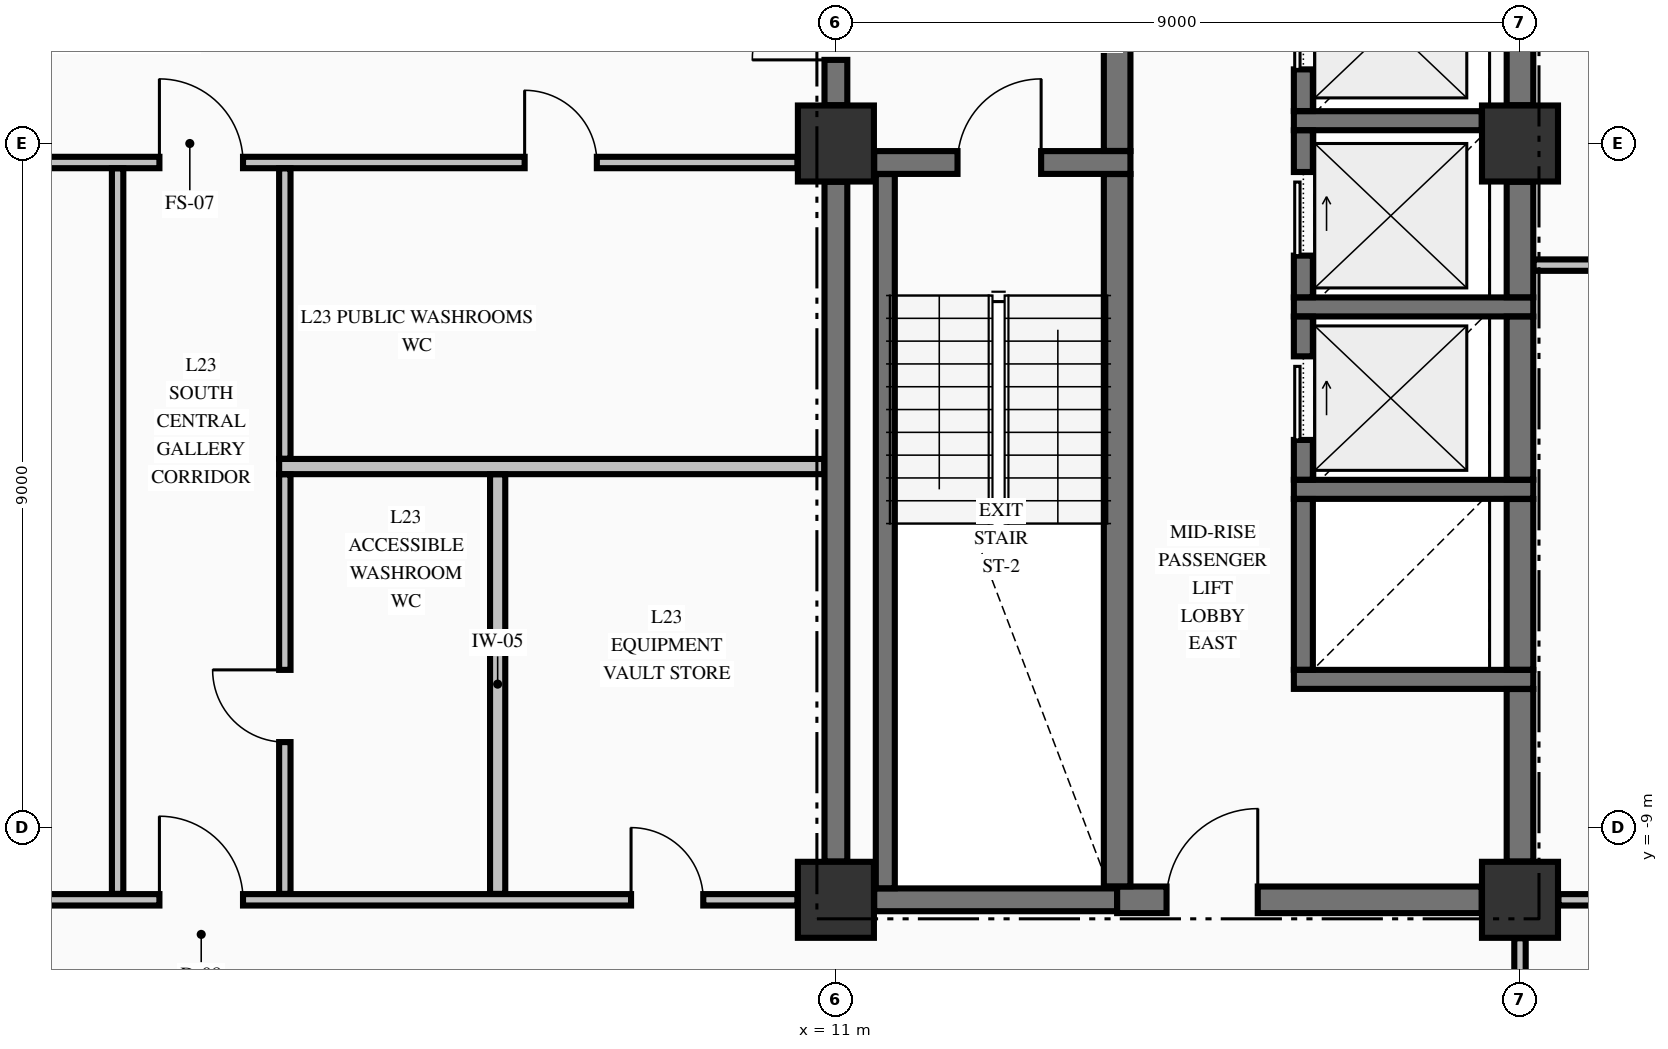
"""IFC4 building model, lengths in metres.
Left out: names, types, materials, properties, quantities, classifications, styles, units other than length and angle.
Written with IfcOpenShell. Run it as: python <this file> out.ifc"""

import sys

from ifc_helpers import new_model, si_unit, direction, frame, frame_2d, origin, origin_2d, place, context, subcontext, project, spatial, rectangle, extrude, element, fill, save


model = new_model("IFC4")
c1 = context("Model", 3, precision=1e-05, world=origin(), true_north=direction((0.0, 1.0)))
c2 = subcontext(c1, "Body", "Model", "MODEL_VIEW")
j1 = project(units=[si_unit("LENGTHUNIT", "METRE"), si_unit("PLANEANGLEUNIT", "RADIAN")], contexts=[c1])
p1 = place(None, origin())
s1 = spatial("IfcSite", under=j1, at=p1, CompositionType="ELEMENT")
p2 = place(p1, origin())
s2 = spatial("IfcBuilding", under=s1, at=p2, CompositionType="ELEMENT")
p3 = place(p2, frame((0.0, 0.0, 94.93)))
s3 = spatial("IfcBuildingStorey", under=s2, at=p3, CompositionType="ELEMENT", Elevation=94.93)
for number, where, z_axis, x_axis in (
    (1, (11.0, -9.95, -0.25), (0.0, 0.0, 1.0), (1.0, 0.0, 0.0)),
    (2, (11.0, 0.0, -0.25), (0.0, 0.0, 1.0), (1.0, 0.0, 0.0)),
    (3, (20.0, -9.95, -0.25), (0.0, 0.0, 1.0), (1.0, 0.0, 0.0)),
    (4, (20.0, 0.0, -0.25), (0.0, 0.0, 1.0), (1.0, 0.0, 0.0)),
):
    element("IfcColumn", number, at=place(p3, frame(where, z_axis=z_axis, x_axis=x_axis)), inside=s3, PredefinedType="COLUMN", context=c2, shape_type="SweptSolid", body=[
        extrude(rectangle(XDim=1.0, YDim=1.0, at=origin_2d()), origin(), (0.0, 0.0, 1.0), 3.545),
    ])
p4 = place(p3, frame((11.504, -9.95, 0.0), z_axis=(0.0, 0.0, 1.0), x_axis=(1.0, 0.0, 0.0)))
e5 = element("IfcWall", 5, at=p4, inside=s3, PredefinedType="SHEAR", context=c2, shape_type="SweptSolid", body=[
    extrude(rectangle(XDim=3.196, YDim=0.3, at=frame_2d((1.598, 0.0))), origin(), (0.0, 0.0, 1.0), 3.295),
])
p5 = place(p3, frame((14.7, -9.95, 0.0), z_axis=(0.0, 0.0, 1.0), x_axis=(1.0, 0.0, 0.0)))
e6 = element("IfcWall", 6, at=p5, inside=s3, PredefinedType="SHEAR", context=c2, shape_type="SweptSolid", body=[
    extrude(rectangle(XDim=4.796, YDim=0.35, at=frame_2d((2.398, 0.0))), origin(), (0.0, 0.0, 1.0), 3.295),
])
p6 = place(p5, frame((0.65, 0.0, 0.0)))
e7 = element("IfcOpeningElement", 7, at=p6, cuts=e6, PredefinedType="OPENING", context=c2, shape_type="SweptSolid", body=[
    extrude(rectangle(XDim=1.2, YDim=2.15, at=frame_2d((0.6, 1.075))), frame((0.0, 0.185, 0.0), z_axis=(0.0, -1.0, 0.0), x_axis=(1.0, 0.0, 0.0)), (0.0, 0.0, 1.0), 0.37),
])
for number, where, z_axis, x_axis in (
    (8, (17.025, -7.05, 0.0), (0.0, 0.0, 1.0), (1.0, 0.0, 0.0)),
    (9, (17.025, -4.55, 0.0), (0.0, 0.0, 1.0), (1.0, 0.0, 0.0)),
    (10, (17.025, -2.15, 0.0), (0.0, 0.0, 1.0), (1.0, 0.0, 0.0)),
):
    element("IfcWall", number, at=place(p3, frame(where, z_axis=z_axis, x_axis=x_axis)), inside=s3, PredefinedType="SOLIDWALL", context=c2, shape_type="SweptSolid", body=[
        extrude(rectangle(XDim=3.15, YDim=0.25, at=frame_2d((1.575, 0.0))), origin(), (0.0, 0.0, 1.0), 3.295),
    ])
p7 = place(p3, frame((11.504, -0.25, 0.0), z_axis=(0.0, 0.0, 1.0), x_axis=(1.0, 0.0, 0.0)))
e11 = element("IfcWall", 11, at=p7, inside=s3, PredefinedType="SHEAR", context=c2, shape_type="SweptSolid", body=[
    extrude(rectangle(XDim=3.371, YDim=0.3, at=frame_2d((1.686, 0.0))), origin(), (0.0, 0.0, 1.0), 3.295),
])
p8 = place(p7, frame((1.096, 0.0, 0.0)))
e12 = element("IfcOpeningElement", 12, at=p8, cuts=e11, PredefinedType="OPENING", context=c2, shape_type="SweptSolid", body=[
    extrude(rectangle(XDim=1.1, YDim=2.15, at=frame_2d((0.55, 1.075))), frame((0.0, 0.16, 0.0), z_axis=(0.0, -1.0, 0.0), x_axis=(1.0, 0.0, 0.0)), (0.0, 0.0, 1.0), 0.32),
])
p9 = place(p3, frame((17.025, 0.3, 0.0), z_axis=(0.0, 0.0, 1.0), x_axis=(1.0, 0.0, 0.0)))
e13 = element("IfcWall", 13, at=p9, inside=s3, PredefinedType="SOLIDWALL", context=c2, shape_type="SweptSolid", body=[
    extrude(rectangle(XDim=2.471, YDim=0.25, at=frame_2d((1.236, 0.0))), origin(), (0.0, 0.0, 1.0), 3.295),
])
p10 = place(p3, frame((-10.494, -9.95, 0.0), z_axis=(0.0, 0.0, 1.0), x_axis=(1.0, 0.0, 0.0)))
e14 = element("IfcWall", 14, at=p10, inside=s3, PredefinedType="PARTITIONING", context=c2, shape_type="SweptSolid", body=[
    extrude(rectangle(XDim=20.988, YDim=0.15, at=frame_2d((10.494, 0.0))), origin(), (0.0, 0.0, 1.0), 3.295),
])
p11 = place(p10, frame((12.594, 0.0, 0.0)))
e15 = element("IfcOpeningElement", 15, at=p11, cuts=e14, PredefinedType="OPENING", context=c2, shape_type="SweptSolid", body=[
    extrude(rectangle(XDim=1.1, YDim=2.15, at=frame_2d((0.55, 1.075))), frame((0.0, 0.085, 0.0), z_axis=(0.0, -1.0, 0.0), x_axis=(1.0, 0.0, 0.0)), (0.0, 0.0, 1.0), 0.17),
])
p12 = place(p10, frame((18.799, 0.0, 0.0)))
e16 = element("IfcOpeningElement", 16, at=p12, cuts=e14, PredefinedType="OPENING", context=c2, shape_type="SweptSolid", body=[
    extrude(rectangle(XDim=0.95, YDim=2.15, at=frame_2d((0.475, 1.075))), frame((0.0, 0.085, 0.0), z_axis=(0.0, -1.0, 0.0), x_axis=(1.0, 0.0, 0.0)), (0.0, 0.0, 1.0), 0.17),
])
p13 = place(p3, frame((20.506, -9.95, 0.0), z_axis=(0.0, 0.0, 1.0), x_axis=(1.0, 0.0, 0.0)))
e17 = element("IfcWall", 17, at=p13, inside=s3, PredefinedType="PARTITIONING", context=c2, shape_type="SweptSolid", body=[
    extrude(rectangle(XDim=7.329, YDim=0.15, at=frame_2d((3.665, 0.0))), origin(), (0.0, 0.0, 1.0), 3.295),
])
p14 = place(p13, frame((3.019, 0.0, 0.0)))
e18 = element("IfcOpeningElement", 18, at=p14, cuts=e17, PredefinedType="OPENING", context=c2, shape_type="SweptSolid", body=[
    extrude(rectangle(XDim=0.95, YDim=2.15, at=frame_2d((0.475, 1.075))), frame((0.0, 0.085, 0.0), z_axis=(0.0, -1.0, 0.0), x_axis=(1.0, 0.0, 0.0)), (0.0, 0.0, 1.0), 0.17),
])
p15 = place(p3, frame((3.675, -4.25, 0.0), z_axis=(0.0, 0.0, 1.0), x_axis=(1.0, 0.0, 0.0)))
e19 = element("IfcWall", 19, at=p15, inside=s3, PredefinedType="PARTITIONING", context=c2, shape_type="SweptSolid", body=[
    extrude(rectangle(XDim=7.172, YDim=0.2, at=frame_2d((3.586, 0.0))), origin(), (0.0, 0.0, 1.0), 3.295),
])
p16 = place(p3, frame((20.178, -1.6, 0.0), z_axis=(0.0, 0.0, 1.0), x_axis=(1.0, 0.0, 0.0)))
e20 = element("IfcWall", 20, at=p16, inside=s3, PredefinedType="PARTITIONING", context=c2, shape_type="SweptSolid", body=[
    extrude(rectangle(XDim=7.657, YDim=0.15, at=frame_2d((3.829, 0.0))), origin(), (0.0, 0.0, 1.0), 3.295),
])
p17 = place(p3, frame((-10.494, -0.25, 0.0), z_axis=(0.0, 0.0, 1.0), x_axis=(1.0, 0.0, 0.0)))
e21 = element("IfcWall", 21, at=p17, inside=s3, PredefinedType="PARTITIONING", context=c2, shape_type="SweptSolid", body=[
    extrude(rectangle(XDim=20.988, YDim=0.15, at=frame_2d((10.494, 0.0))), origin(), (0.0, 0.0, 1.0), 3.295),
])
p18 = place(p17, frame((12.594, 0.0, 0.0)))
e22 = element("IfcOpeningElement", 22, at=p18, cuts=e21, PredefinedType="OPENING", context=c2, shape_type="SweptSolid", body=[
    extrude(rectangle(XDim=1.1, YDim=2.15, at=frame_2d((0.55, 1.075))), frame((0.0, 0.085, 0.0), z_axis=(0.0, -1.0, 0.0), x_axis=(1.0, 0.0, 0.0)), (0.0, 0.0, 1.0), 0.17),
])
p19 = place(p17, frame((5.249, 0.0, 0.0)))
e23 = element("IfcOpeningElement", 23, at=p19, cuts=e21, PredefinedType="OPENING", context=c2, shape_type="SweptSolid", body=[
    extrude(rectangle(XDim=1.05, YDim=2.15, at=frame_2d((0.525, 1.075))), frame((0.0, 0.085, 0.0), z_axis=(0.0, -1.0, 0.0), x_axis=(1.0, 0.0, 0.0)), (0.0, 0.0, 1.0), 0.17),
])
p20 = place(p17, frame((17.399, 0.0, 0.0)))
e24 = element("IfcOpeningElement", 24, at=p20, cuts=e21, PredefinedType="OPENING", context=c2, shape_type="SweptSolid", body=[
    extrude(rectangle(XDim=0.95, YDim=2.15, at=frame_2d((0.475, 1.075))), frame((0.0, 0.085, 0.0), z_axis=(0.0, -1.0, 0.0), x_axis=(1.0, 0.0, 0.0)), (0.0, 0.0, 1.0), 0.17),
])
p21 = place(p3, frame((11.0, -9.446, 0.0), z_axis=(0.0, 0.0, 1.0), x_axis=(0.0, 1.0, 0.0)))
e25 = element("IfcWall", 25, at=p21, inside=s3, PredefinedType="SHEAR", context=c2, shape_type="SweptSolid", body=[
    extrude(rectangle(XDim=8.942, YDim=0.3, at=frame_2d((4.471, 0.0))), origin(), (0.0, 0.0, 1.0), 3.295),
])
p22 = place(p3, frame((11.0, 0.504, 0.0), z_axis=(0.0, 0.0, 1.0), x_axis=(0.0, 1.0, 0.0)))
e26 = element("IfcWall", 26, at=p22, inside=s3, PredefinedType="SHEAR", context=c2, shape_type="SweptSolid", body=[
    extrude(rectangle(XDim=2.244, YDim=0.3, at=frame_2d((1.122, 0.0))), origin(), (0.0, 0.0, 1.0), 3.295),
])
p23 = place(p22, frame((0.596, 0.0, 0.0)))
e27 = element("IfcOpeningElement", 27, at=p23, cuts=e26, PredefinedType="OPENING", context=c2, shape_type="SweptSolid", body=[
    extrude(rectangle(XDim=1.1, YDim=2.15, at=frame_2d((0.55, 1.075))), frame((0.0, 0.16, 0.0), z_axis=(0.0, -1.0, 0.0), x_axis=(1.0, 0.0, 0.0)), (0.0, 0.0, 1.0), 0.32),
])
p24 = place(p3, frame((11.65, -9.798, 0.0), z_axis=(0.0, 0.0, 1.0), x_axis=(0.0, 1.0, 0.0)))
e28 = element("IfcWall", 28, at=p24, inside=s3, PredefinedType="SOLIDWALL", context=c2, shape_type="SweptSolid", body=[
    extrude(rectangle(XDim=9.396, YDim=0.25, at=frame_2d((4.698, 0.0))), origin(), (0.0, 0.0, 1.0), 3.295),
])
p25 = place(p3, frame((14.7, -9.773, 0.0), z_axis=(0.0, 0.0, 1.0), x_axis=(0.0, 1.0, 0.0)))
e29 = element("IfcWall", 29, at=p25, inside=s3, PredefinedType="SHEAR", context=c2, shape_type="SweptSolid", body=[
    extrude(rectangle(XDim=9.371, YDim=0.35, at=frame_2d((4.686, 0.0))), origin(), (0.0, 0.0, 1.0), 3.295),
])
p26 = place(p3, frame((14.7, -0.098, 0.0), z_axis=(0.0, 0.0, 1.0), x_axis=(0.0, 1.0, 0.0)))
e30 = element("IfcWall", 30, at=p26, inside=s3, PredefinedType="SHEAR", context=c2, shape_type="SweptSolid", body=[
    extrude(rectangle(XDim=2.846, YDim=0.35, at=frame_2d((1.423, 0.0))), origin(), (0.0, 0.0, 1.0), 3.295),
])
p27 = place(p3, frame((17.15, -6.923, 0.0), z_axis=(0.0, 0.0, 1.0), x_axis=(0.0, 1.0, 0.0)))
e31 = element("IfcWall", 31, at=p27, inside=s3, PredefinedType="SOLIDWALL", context=c2, shape_type="SweptSolid", body=[
    extrude(rectangle(XDim=2.246, YDim=0.25, at=frame_2d((1.123, 0.0))), origin(), (0.0, 0.0, 1.0), 3.295),
])
p28 = place(p3, frame((17.15, -4.423, 0.0), z_axis=(0.0, 0.0, 1.0), x_axis=(0.0, 1.0, 0.0)))
e32 = element("IfcWall", 32, at=p28, inside=s3, PredefinedType="SOLIDWALL", context=c2, shape_type="SweptSolid", body=[
    extrude(rectangle(XDim=2.146, YDim=0.25, at=frame_2d((1.073, 0.0))), origin(), (0.0, 0.0, 1.0), 3.295),
])
p29 = place(p28, frame((0.523, 0.0, 0.0)))
e33 = element("IfcOpeningElement", 33, at=p29, cuts=e32, PredefinedType="OPENING", context=c2, shape_type="SweptSolid", body=[
    extrude(rectangle(XDim=1.1, YDim=2.2, at=frame_2d((0.55, 1.1))), frame((0.0, 0.135, 0.0), z_axis=(0.0, -1.0, 0.0), x_axis=(1.0, 0.0, 0.0)), (0.0, 0.0, 1.0), 0.27),
])
p30 = place(p3, frame((17.15, -2.023, 0.0), z_axis=(0.0, 0.0, 1.0), x_axis=(0.0, 1.0, 0.0)))
e34 = element("IfcWall", 34, at=p30, inside=s3, PredefinedType="SOLIDWALL", context=c2, shape_type="SweptSolid", body=[
    extrude(rectangle(XDim=2.196, YDim=0.25, at=frame_2d((1.098, 0.0))), origin(), (0.0, 0.0, 1.0), 3.295),
])
p31 = place(p30, frame((0.548, 0.0, 0.0)))
e35 = element("IfcOpeningElement", 35, at=p31, cuts=e34, PredefinedType="OPENING", context=c2, shape_type="SweptSolid", body=[
    extrude(rectangle(XDim=1.1, YDim=2.2, at=frame_2d((0.55, 1.1))), frame((0.0, 0.135, 0.0), z_axis=(0.0, -1.0, 0.0), x_axis=(1.0, 0.0, 0.0)), (0.0, 0.0, 1.0), 0.27),
])
p32 = place(p3, frame((17.15, 0.427, 0.0), z_axis=(0.0, 0.0, 1.0), x_axis=(0.0, 1.0, 0.0)))
e36 = element("IfcWall", 36, at=p32, inside=s3, PredefinedType="SOLIDWALL", context=c2, shape_type="SweptSolid", body=[
    extrude(rectangle(XDim=2.196, YDim=0.25, at=frame_2d((1.098, 0.0))), origin(), (0.0, 0.0, 1.0), 3.295),
])
p33 = place(p32, frame((0.548, 0.0, 0.0)))
e37 = element("IfcOpeningElement", 37, at=p33, cuts=e36, PredefinedType="OPENING", context=c2, shape_type="SweptSolid", body=[
    extrude(rectangle(XDim=1.1, YDim=2.2, at=frame_2d((0.55, 1.1))), frame((0.0, 0.135, 0.0), z_axis=(0.0, -1.0, 0.0), x_axis=(1.0, 0.0, 0.0)), (0.0, 0.0, 1.0), 0.27),
])
p34 = place(p3, frame((20.0, -9.446, 0.0), z_axis=(0.0, 0.0, 1.0), x_axis=(0.0, 1.0, 0.0)))
e38 = element("IfcWall", 38, at=p34, inside=s3, PredefinedType="SHEAR", context=c2, shape_type="SweptSolid", body=[
    extrude(rectangle(XDim=2.269, YDim=0.35, at=frame_2d((1.135, 0.0))), origin(), (0.0, 0.0, 1.0), 3.295),
])
p35 = place(p3, frame((20.0, -6.923, 0.0), z_axis=(0.0, 0.0, 1.0), x_axis=(0.0, 1.0, 0.0)))
e39 = element("IfcWall", 39, at=p35, inside=s3, PredefinedType="SHEAR", context=c2, shape_type="SweptSolid", body=[
    extrude(rectangle(XDim=2.246, YDim=0.35, at=frame_2d((1.123, 0.0))), origin(), (0.0, 0.0, 1.0), 3.295),
])
p36 = place(p3, frame((20.0, -4.423, 0.0), z_axis=(0.0, 0.0, 1.0), x_axis=(0.0, 1.0, 0.0)))
e40 = element("IfcWall", 40, at=p36, inside=s3, PredefinedType="SHEAR", context=c2, shape_type="SweptSolid", body=[
    extrude(rectangle(XDim=2.146, YDim=0.35, at=frame_2d((1.073, 0.0))), origin(), (0.0, 0.0, 1.0), 3.295),
])
p37 = place(p3, frame((20.0, -2.023, 0.0), z_axis=(0.0, 0.0, 1.0), x_axis=(0.0, 1.0, 0.0)))
e41 = element("IfcWall", 41, at=p37, inside=s3, PredefinedType="SHEAR", context=c2, shape_type="SweptSolid", body=[
    extrude(rectangle(XDim=1.519, YDim=0.35, at=frame_2d((0.76, 0.0))), origin(), (0.0, 0.0, 1.0), 3.295),
])
p38 = place(p3, frame((20.0, 0.504, 0.0), z_axis=(0.0, 0.0, 1.0), x_axis=(0.0, 1.0, 0.0)))
e42 = element("IfcWall", 42, at=p38, inside=s3, PredefinedType="SHEAR", context=c2, shape_type="SweptSolid", body=[
    extrude(rectangle(XDim=2.119, YDim=0.35, at=frame_2d((1.06, 0.0))), origin(), (0.0, 0.0, 1.0), 3.295),
])
p39 = place(p3, frame((1.55, -9.872, 0.0), z_axis=(0.0, 0.0, 1.0), x_axis=(0.0, 1.0, 0.0)))
e43 = element("IfcWall", 43, at=p39, inside=s3, PredefinedType="PARTITIONING", context=c2, shape_type="SweptSolid", body=[
    extrude(rectangle(XDim=9.544, YDim=0.15, at=frame_2d((4.772, 0.0))), origin(), (0.0, 0.0, 1.0), 3.295),
])
p40 = place(p3, frame((3.75, -9.872, 0.0), z_axis=(0.0, 0.0, 1.0), x_axis=(0.0, 1.0, 0.0)))
e44 = element("IfcWall", 44, at=p40, inside=s3, PredefinedType="PARTITIONING", context=c2, shape_type="SweptSolid", body=[
    extrude(rectangle(XDim=5.519, YDim=0.15, at=frame_2d((2.76, 0.0))), origin(), (0.0, 0.0, 1.0), 3.295),
])
p41 = place(p40, frame((1.997, 0.0, 0.0)))
e45 = element("IfcOpeningElement", 45, at=p41, cuts=e44, PredefinedType="OPENING", context=c2, shape_type="SweptSolid", body=[
    extrude(rectangle(XDim=0.95, YDim=2.15, at=frame_2d((0.475, 1.075))), frame((0.0, 0.085, 0.0), z_axis=(0.0, -1.0, 0.0), x_axis=(1.0, 0.0, 0.0)), (0.0, 0.0, 1.0), 0.17),
])
p42 = place(p3, frame((3.75, -4.147, 0.0), z_axis=(0.0, 0.0, 1.0), x_axis=(0.0, 1.0, 0.0)))
e46 = element("IfcWall", 46, at=p42, inside=s3, PredefinedType="PARTITIONING", context=c2, shape_type="SweptSolid", body=[
    extrude(rectangle(XDim=3.819, YDim=0.15, at=frame_2d((1.91, 0.0))), origin(), (0.0, 0.0, 1.0), 3.295),
])
p43 = place(p3, frame((6.55, -9.872, 0.0), z_axis=(0.0, 0.0, 1.0), x_axis=(0.0, 1.0, 0.0)))
e47 = element("IfcWall", 47, at=p43, inside=s3, PredefinedType="PARTITIONING", context=c2, shape_type="SweptSolid", body=[
    extrude(rectangle(XDim=5.519, YDim=0.2, at=frame_2d((2.76, 0.0))), origin(), (0.0, 0.0, 1.0), 3.295),
])
p44 = place(p3, frame((20.0, -13.022, 0.0), z_axis=(0.0, 0.0, 1.0), x_axis=(0.0, 1.0, 0.0)))
e48 = element("IfcWall", 48, at=p44, inside=s3, PredefinedType="PARTITIONING", context=c2, shape_type="SweptSolid", body=[
    extrude(rectangle(XDim=2.566, YDim=0.15, at=frame_2d((1.283, 0.0))), origin(), (0.0, 0.0, 1.0), 2.785),
])
p45 = place(p44, frame((1.027, 0.0, 0.0)))
e49 = element("IfcOpeningElement", 49, at=p45, cuts=e48, PredefinedType="OPENING", context=c2, shape_type="SweptSolid", body=[
    extrude(rectangle(XDim=0.95, YDim=2.15, at=frame_2d((0.475, 1.075))), frame((0.0, 0.085, 0.0), z_axis=(0.0, -1.0, 0.0), x_axis=(1.0, 0.0, 0.0)), (0.0, 0.0, 1.0), 0.17),
])
p46 = place(p8, origin())
e50 = element("IfcDoor", 50, at=p46, inside=s3, OperationType="SINGLE_SWING_RIGHT", PredefinedType="DOOR", context=c2, shape_type="SweptSolid", body=[
    extrude(rectangle(XDim=1.1, YDim=2.15, at=frame_2d((0.55, 1.075))), frame((0.0, 0.025, 0.0), z_axis=(0.0, -1.0, 0.0), x_axis=(1.0, 0.0, 0.0)), (0.0, 0.0, 1.0), 0.05),
])
fill(e12, e50)
p47 = place(p23, origin())
e51 = element("IfcDoor", 51, at=p47, inside=s3, OperationType="SINGLE_SWING_LEFT", PredefinedType="DOOR", context=c2, shape_type="SweptSolid", body=[
    extrude(rectangle(XDim=1.1, YDim=2.15, at=frame_2d((0.55, 1.075))), frame((0.0, 0.025, 0.0), z_axis=(0.0, -1.0, 0.0), x_axis=(1.0, 0.0, 0.0)), (0.0, 0.0, 1.0), 0.05),
])
fill(e27, e51)
p48 = place(p29, origin())
e52 = element("IfcDoor", 52, at=p48, inside=s3, OperationType="SLIDING_TO_RIGHT", PredefinedType="DOOR", context=c2, shape_type="SweptSolid", body=[
    extrude(rectangle(XDim=1.1, YDim=2.2, at=frame_2d((0.55, 1.1))), frame((0.0, 0.025, 0.0), z_axis=(0.0, -1.0, 0.0), x_axis=(1.0, 0.0, 0.0)), (0.0, 0.0, 1.0), 0.05),
])
fill(e33, e52)
p49 = place(p31, origin())
e53 = element("IfcDoor", 53, at=p49, inside=s3, OperationType="SLIDING_TO_RIGHT", PredefinedType="DOOR", context=c2, shape_type="SweptSolid", body=[
    extrude(rectangle(XDim=1.1, YDim=2.2, at=frame_2d((0.55, 1.1))), frame((0.0, 0.025, 0.0), z_axis=(0.0, -1.0, 0.0), x_axis=(1.0, 0.0, 0.0)), (0.0, 0.0, 1.0), 0.05),
])
fill(e35, e53)
p50 = place(p33, origin())
e54 = element("IfcDoor", 54, at=p50, inside=s3, OperationType="SLIDING_TO_RIGHT", PredefinedType="DOOR", context=c2, shape_type="SweptSolid", body=[
    extrude(rectangle(XDim=1.1, YDim=2.2, at=frame_2d((0.55, 1.1))), frame((0.0, 0.025, 0.0), z_axis=(0.0, -1.0, 0.0), x_axis=(1.0, 0.0, 0.0)), (0.0, 0.0, 1.0), 0.05),
])
fill(e37, e54)
p51 = place(p6, origin())
e55 = element("IfcDoor", 55, at=p51, inside=s3, OperationType="SINGLE_SWING_RIGHT", PredefinedType="DOOR", context=c2, shape_type="SweptSolid", body=[
    extrude(rectangle(XDim=1.2, YDim=2.15, at=frame_2d((0.6, 1.075))), frame((0.0, 0.025, 0.0), z_axis=(0.0, -1.0, 0.0), x_axis=(1.0, 0.0, 0.0)), (0.0, 0.0, 1.0), 0.05),
])
fill(e7, e55)
p52 = place(p11, origin())
e56 = element("IfcDoor", 56, at=p52, inside=s3, OperationType="SINGLE_SWING_LEFT", PredefinedType="DOOR", context=c2, shape_type="SweptSolid", body=[
    extrude(rectangle(XDim=1.1, YDim=2.15, at=frame_2d((0.55, 1.075))), frame((0.0, 0.025, 0.0), z_axis=(0.0, -1.0, 0.0), x_axis=(1.0, 0.0, 0.0)), (0.0, 0.0, 1.0), 0.05),
])
fill(e15, e56)
p53 = place(p18, origin())
e57 = element("IfcDoor", 57, at=p53, inside=s3, OperationType="SINGLE_SWING_LEFT", PredefinedType="DOOR", context=c2, shape_type="SweptSolid", body=[
    extrude(rectangle(XDim=1.1, YDim=2.15, at=frame_2d((0.55, 1.075))), frame((0.0, 0.025, 0.0), z_axis=(0.0, -1.0, 0.0), x_axis=(1.0, 0.0, 0.0)), (0.0, 0.0, 1.0), 0.05),
])
fill(e22, e57)
p54 = place(p20, origin())
e58 = element("IfcDoor", 58, at=p54, inside=s3, OperationType="SINGLE_SWING_LEFT", PredefinedType="DOOR", context=c2, shape_type="SweptSolid", body=[
    extrude(rectangle(XDim=0.95, YDim=2.15, at=frame_2d((0.475, 1.075))), frame((0.0, 0.025, 0.0), z_axis=(0.0, -1.0, 0.0), x_axis=(1.0, 0.0, 0.0)), (0.0, 0.0, 1.0), 0.05),
])
fill(e24, e58)
p55 = place(p41, origin())
e59 = element("IfcDoor", 59, at=p55, inside=s3, OperationType="SINGLE_SWING_RIGHT", PredefinedType="DOOR", context=c2, shape_type="SweptSolid", body=[
    extrude(rectangle(XDim=0.95, YDim=2.15, at=frame_2d((0.475, 1.075))), frame((0.0, 0.025, 0.0), z_axis=(0.0, -1.0, 0.0), x_axis=(1.0, 0.0, 0.0)), (0.0, 0.0, 1.0), 0.05),
])
fill(e45, e59)
p56 = place(p12, origin())
e60 = element("IfcDoor", 60, at=p56, inside=s3, OperationType="SINGLE_SWING_LEFT", PredefinedType="DOOR", context=c2, shape_type="SweptSolid", body=[
    extrude(rectangle(XDim=0.95, YDim=2.15, at=frame_2d((0.475, 1.075))), frame((0.0, 0.025, 0.0), z_axis=(0.0, -1.0, 0.0), x_axis=(1.0, 0.0, 0.0)), (0.0, 0.0, 1.0), 0.05),
])
fill(e16, e60)
save(model, sys.argv[1])
